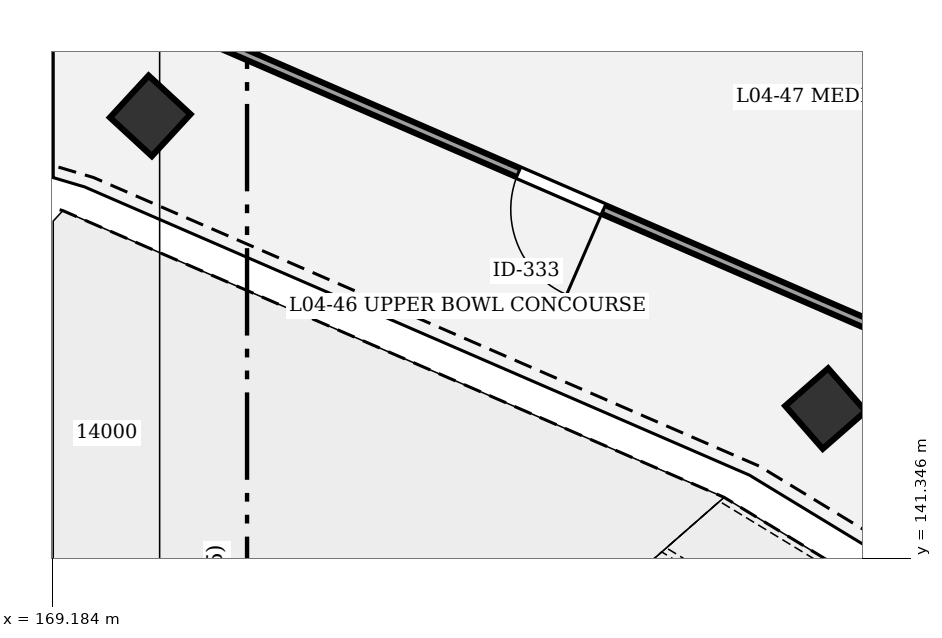
"""IFC4 building model, lengths in metres.
Left out: names, types, materials, properties, quantities, classifications, styles, units other than length and angle.
Written with IfcOpenShell. Run it as: python <this file> out.ifc"""

import sys

from ifc_helpers import new_model, si_unit, direction, frame, frame_2d, origin, origin_2d, place, context, subcontext, project, spatial, rectangle, extrude, element, fill, save


model = new_model("IFC4")
c1 = context("Model", 3, precision=1e-05, world=origin(), true_north=direction((0.0, 1.0)))
c2 = subcontext(c1, "Body", "Model", "MODEL_VIEW")
j1 = project(units=[si_unit("LENGTHUNIT", "METRE"), si_unit("PLANEANGLEUNIT", "RADIAN")], contexts=[c1])
p1 = place(None, origin())
s1 = spatial("IfcSite", under=j1, at=p1, CompositionType="ELEMENT")
p2 = place(p1, origin())
s2 = spatial("IfcBuilding", under=s1, at=p2, CompositionType="ELEMENT")
p3 = place(p2, frame((0.0, 0.0, 19.2)))
s3 = spatial("IfcBuildingStorey", under=s2, at=p3, CompositionType="ELEMENT", Elevation=19.2)
for number, where, z_axis, x_axis in (
    (1, (179.36, 143.317, 0.0), (0.0, 0.0, 1.0), (0.753, 0.659, 0.0)),
    (2, (170.476, 147.168, 0.0), (0.0, 0.0, 1.0), (0.678, 0.735, 0.0)),
):
    element("IfcColumn", number, at=place(p3, frame(where, z_axis=z_axis, x_axis=x_axis)), inside=s3, PredefinedType="COLUMN", context=c2, shape_type="SweptSolid", body=[
        extrude(rectangle(XDim=0.75, YDim=0.75, at=origin_2d()), origin(), (0.0, 0.0, 1.0), 4.8),
    ])
p4 = place(p3, frame((180.354, 144.239, 0.0), z_axis=(0.0, 0.0, 1.0), x_axis=(-0.917512083526, 0.397707903596, 0.0)))
e3 = element("IfcWall", 3, at=p4, inside=s3, PredefinedType="PARTITIONING", context=c2, shape_type="SweptSolid", body=[
    extrude(rectangle(XDim=9.752, YDim=0.125, at=frame_2d((4.876, 0.0))), origin(), (0.0, 0.0, 1.0), 3.55),
])
p5 = place(p4, frame((4.266, 0.0, 0.0)))
e4 = element("IfcOpeningElement", 4, at=p5, cuts=e3, PredefinedType="OPENING", context=c2, shape_type="SweptSolid", body=[
    extrude(rectangle(XDim=1.22, YDim=2.1, at=frame_2d((0.61, 1.05))), frame((0.0, 0.073, 0.0), z_axis=(0.0, -1.0, 0.0), x_axis=(1.0, 0.0, 0.0)), (0.0, 0.0, 1.0), 0.145),
])
p6 = place(p5, origin())
e5 = element("IfcDoor", 5, at=p6, inside=s3, OperationType="SINGLE_SWING_LEFT", PredefinedType="DOOR", context=c2, shape_type="SweptSolid", body=[
    extrude(rectangle(XDim=1.22, YDim=2.1, at=frame_2d((0.61, 1.05))), frame((0.0, 0.025, 0.0), z_axis=(0.0, -1.0, 0.0), x_axis=(1.0, 0.0, 0.0)), (0.0, 0.0, 1.0), 0.05),
])
fill(e4, e5)
save(model, sys.argv[1])
